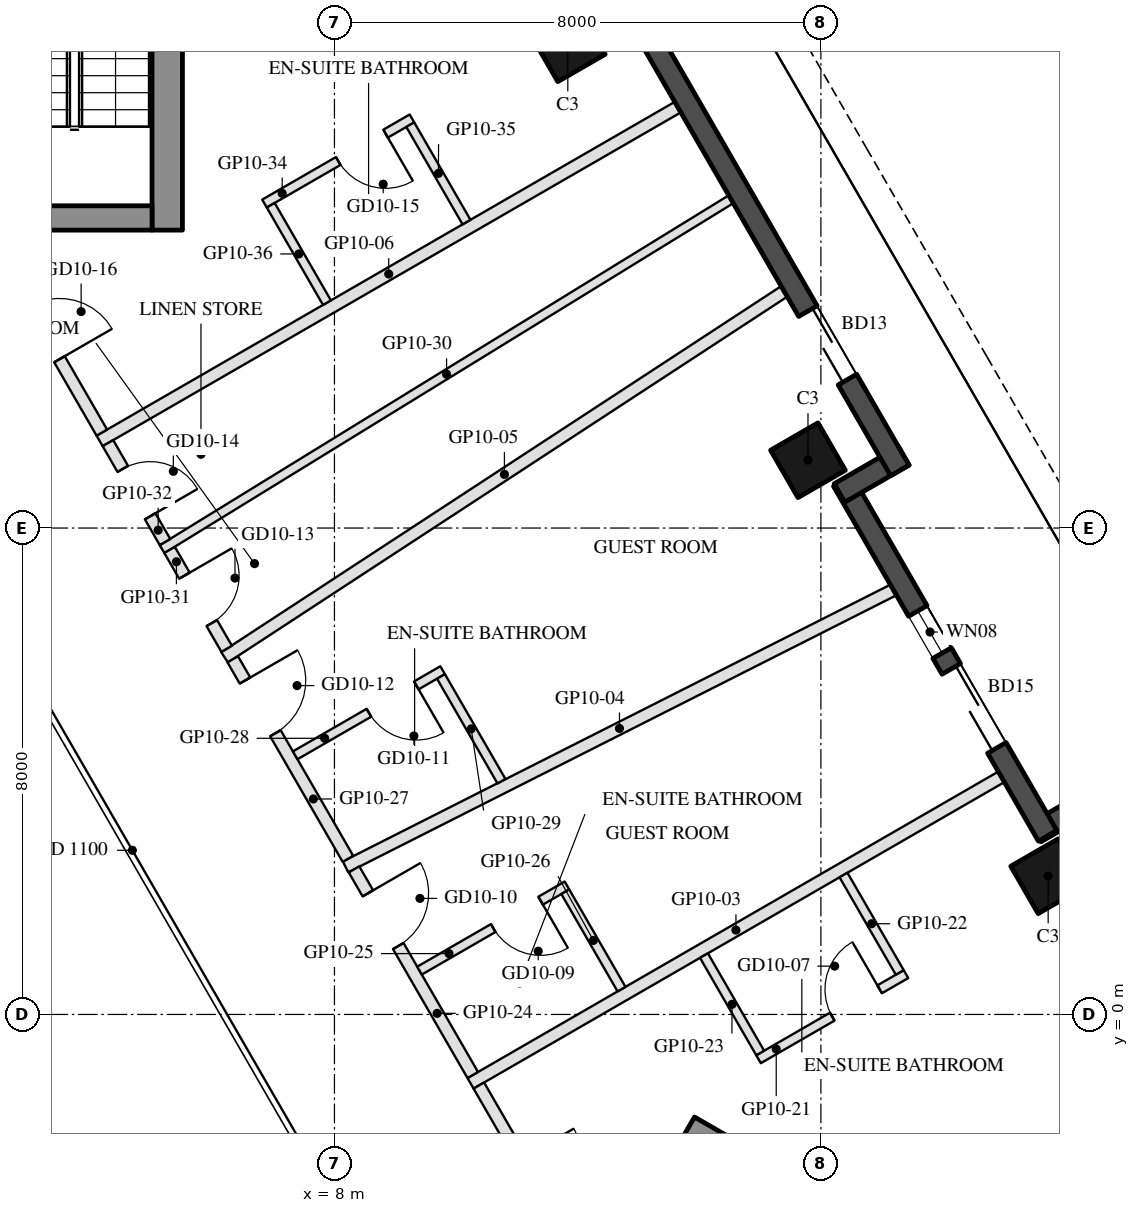
"""IFC4 building model, lengths in metres.
Left out: names, types, materials, properties, quantities, classifications, styles, units other than length and angle.
Written with IfcOpenShell. Run it as: python <this file> out.ifc"""

import sys

from ifc_helpers import new_model, si_unit, direction, frame, frame_2d, origin, origin_2d, place, context, subcontext, project, spatial, rectangle, hollow_rectangle, extrude, element, fill, save


model = new_model("IFC4")
c1 = context("Model", 3, precision=1e-05, world=origin(), true_north=direction((0.0, 1.0)))
c2 = subcontext(c1, "Body", "Model", "MODEL_VIEW")
j1 = project(units=[si_unit("LENGTHUNIT", "METRE"), si_unit("PLANEANGLEUNIT", "RADIAN")], contexts=[c1])
p1 = place(None, origin())
s1 = spatial("IfcSite", under=j1, at=p1, CompositionType="ELEMENT")
p2 = place(p1, origin())
s2 = spatial("IfcBuilding", under=s1, at=p2, CompositionType="ELEMENT")
p3 = place(p2, frame((0.0, 0.0, 120.5)))
s3 = spatial("IfcBuildingStorey", under=s2, at=p3, CompositionType="ELEMENT", Elevation=120.5)
for number, where, z_axis, x_axis in (
    (1, (19.738, 2.273, 0.0), (0.0, 0.0, 1.0), (-0.5, 0.866, 0.0)),
    (2, (15.788, 9.115, 0.0), (0.0, 0.0, 1.0), (-0.5, 0.866, 0.0)),
    (3, (11.838, 15.957, 0.0), (0.0, 0.0, 1.0), (-0.5, 0.866, 0.0)),
):
    element("IfcColumn", number, at=place(p3, frame(where, z_axis=z_axis, x_axis=x_axis)), inside=s3, PredefinedType="COLUMN", context=c2, shape_type="SweptSolid", body=[
        extrude(hollow_rectangle(XDim=0.9, YDim=0.9, WallThickness=0.04, at=origin_2d()), origin(), (0.0, 0.0, 1.0), 3.7),
    ])
p4 = place(p3, frame((20.588, 3.601, 0.0), z_axis=(0.0, 0.0, 1.0), x_axis=(-0.866005645448, -0.500034220881, 0.0)))
e4 = element("IfcWall", 4, at=p4, inside=s3, PredefinedType="SOLIDWALL", context=c2, shape_type="SweptSolid", body=[
    extrude(rectangle(XDim=1.22, YDim=0.35, at=frame_2d((0.61, 0.0))), origin(), (0.0, 0.0, 1.0), 3.55),
])
p5 = place(p3, frame((19.729, 2.938, 0.0), z_axis=(0.0, 0.0, 1.0), x_axis=(-0.499976430342, 0.866039011305, 0.0)))
e5 = element("IfcWall", 5, at=p5, inside=s3, PredefinedType="SOLIDWALL", context=c2, shape_type="SweptSolid", body=[
    extrude(rectangle(XDim=6.74, YDim=0.35, at=frame_2d((3.37, 0.0))), origin(), (0.0, 0.0, 1.0), 3.55),
])
p6 = place(p5, frame((1.67, 0.0, 0.0)))
e6 = element("IfcOpeningElement", 6, at=p6, cuts=e5, PredefinedType="OPENING", context=c2, shape_type="SweptSolid", body=[
    extrude(rectangle(XDim=1.5, YDim=2.4, at=frame_2d((0.75, 1.2))), frame((0.0, 0.185, 0.0), z_axis=(0.0, -1.0, 0.0), x_axis=(1.0, 0.0, 0.0)), (0.0, 0.0, 1.0), 0.37),
])
p7 = place(p5, frame((3.47, 0.0, 0.3)))
e7 = element("IfcOpeningElement", 7, at=p7, cuts=e5, PredefinedType="OPENING", context=c2, shape_type="SweptSolid", body=[
    extrude(rectangle(XDim=0.8, YDim=2.65, at=frame_2d((0.4, 1.325))), frame((0.0, 0.185, 0.0), z_axis=(0.0, -1.0, 0.0), x_axis=(1.0, 0.0, 0.0)), (0.0, 0.0, 1.0), 0.37),
])
p8 = place(p3, frame((16.306, 8.577, 0.0), z_axis=(0.0, 0.0, 1.0), x_axis=(0.866092288191, 0.499884134912, 0.0)))
e8 = element("IfcWall", 8, at=p8, inside=s3, PredefinedType="SOLIDWALL", context=c2, shape_type="SweptSolid", body=[
    extrude(rectangle(XDim=1.22, YDim=0.35, at=frame_2d((0.61, 0.0))), origin(), (0.0, 0.0, 1.0), 3.55),
])
p9 = place(p3, frame((17.299, 8.948, 0.0), z_axis=(0.0, 0.0, 1.0), x_axis=(-0.500010041276, 0.866019606374, 0.0)))
e9 = element("IfcWall", 9, at=p9, inside=s3, PredefinedType="SOLIDWALL", context=c2, shape_type="SweptSolid", body=[
    extrude(rectangle(XDim=9.7, YDim=0.35, at=frame_2d((4.85, 0.0))), origin(), (0.0, 0.0, 1.0), 3.55),
])
p10 = place(p9, frame((1.725, 0.0, 0.0)))
e10 = element("IfcOpeningElement", 10, at=p10, cuts=e9, PredefinedType="OPENING", context=c2, shape_type="SweptSolid", body=[
    extrude(rectangle(XDim=1.3, YDim=2.4, at=frame_2d((0.65, 1.2))), frame((0.0, 0.185, 0.0), z_axis=(0.0, -1.0, 0.0), x_axis=(1.0, 0.0, 0.0)), (0.0, 0.0, 1.0), 0.37),
])
p11 = place(p3, frame((5.25, 12.9, 0.0), z_axis=(0.0, 0.0, 1.0), x_axis=(0.0, 1.0, 0.0)))
e11 = element("IfcWall", 11, at=p11, inside=s3, PredefinedType="SHEAR", context=c2, shape_type="SweptSolid", body=[
    extrude(rectangle(XDim=14.837, YDim=0.5, at=frame_2d((7.418, 0.0))), origin(), (0.0, 0.0, 1.0), 3.5),
])
p12 = place(p3, frame((5.0, 13.1, 0.0), z_axis=(0.0, 0.0, 1.0), x_axis=(-1.0, 0.0, 0.0)))
e12 = element("IfcWall", 12, at=p12, inside=s3, PredefinedType="SHEAR", context=c2, shape_type="SweptSolid", body=[
    extrude(rectangle(XDim=10.0, YDim=0.4, at=frame_2d((5.0, 0.0))), origin(), (0.0, 0.0, 1.0), 3.5),
])
p13 = place(p12, frame((3.55, 0.0, 0.0)))
e13 = element("IfcOpeningElement", 13, at=p13, cuts=e12, PredefinedType="OPENING", context=c2, shape_type="SweptSolid", body=[
    extrude(rectangle(XDim=1.1, YDim=2.1, at=frame_2d((0.55, 1.05))), frame((0.0, 0.21, 0.0), z_axis=(0.0, -1.0, 0.0), x_axis=(1.0, 0.0, 0.0)), (0.0, 0.0, 1.0), 0.42),
])
p14 = place(p12, frame((5.85, 0.0, 0.0)))
e14 = element("IfcOpeningElement", 14, at=p14, cuts=e12, PredefinedType="OPENING", context=c2, shape_type="SweptSolid", body=[
    extrude(rectangle(XDim=1.4, YDim=2.1, at=frame_2d((0.7, 1.05))), frame((0.0, 0.21, 0.0), z_axis=(0.0, -1.0, 0.0), x_axis=(1.0, 0.0, 0.0)), (0.0, 0.0, 1.0), 0.42),
])
p15 = place(p3, frame((13.797, -1.903, 0.0), z_axis=(0.0, 0.0, 1.0), x_axis=(0.866025009528, -0.500000682871, 0.0)))
e15 = element("IfcWall", 15, at=p15, inside=s3, PredefinedType="SHEAR", context=c2, shape_type="SweptSolid", body=[
    extrude(rectangle(XDim=14.837, YDim=0.5, at=frame_2d((7.418, 0.0))), origin(), (0.0, 0.0, 1.0), 3.5),
])
p16 = place(p3, frame((18.968, 3.907, 0.0), z_axis=(0.0, 0.0, 1.0), x_axis=(-0.866022637375, -0.500004791531, 0.0)))
e16 = element("IfcWall", 16, at=p16, inside=s3, PredefinedType="PARTITIONING", context=c2, shape_type="SweptSolid", body=[
    extrude(rectangle(XDim=10.08, YDim=0.2, at=frame_2d((5.04, 0.0))), origin(), (0.0, 0.0, 1.0), 2.96),
])
p17 = place(p3, frame((17.192, 6.982, 0.0), z_axis=(0.0, 0.0, 1.0), x_axis=(-0.892469554868, -0.451107629766, 0.0)))
e17 = element("IfcWall", 17, at=p17, inside=s3, PredefinedType="PARTITIONING", context=c2, shape_type="SweptSolid", body=[
    extrude(rectangle(XDim=10.096, YDim=0.2, at=frame_2d((5.048, 0.0))), origin(), (0.0, 0.0, 1.0), 2.96),
])
p18 = place(p3, frame((15.397, 11.892, 0.0), z_axis=(0.0, 0.0, 1.0), x_axis=(-0.836898817878, -0.547357624076, 0.0)))
e18 = element("IfcWall", 18, at=p18, inside=s3, PredefinedType="PARTITIONING", context=c2, shape_type="SweptSolid", body=[
    extrude(rectangle(XDim=10.997, YDim=0.2, at=frame_2d((5.499, 0.0))), origin(), (0.0, 0.0, 1.0), 2.96),
])
p19 = place(p3, frame((13.647, 14.923, 0.0), z_axis=(0.0, 0.0, 1.0), x_axis=(-0.866027479907, -0.499996404033, 0.0)))
e19 = element("IfcWall", 19, at=p19, inside=s3, PredefinedType="PARTITIONING", context=c2, shape_type="SweptSolid", body=[
    extrude(rectangle(XDim=10.98, YDim=0.2, at=frame_2d((5.49, 0.0))), origin(), (0.0, 0.0, 1.0), 2.96),
])
p20 = place(p3, frame((10.375, -1.169, 0.0), z_axis=(0.0, 0.0, 1.0), x_axis=(0.500055316652, -0.865993464345, 0.0)))
e20 = element("IfcWall", 20, at=p20, inside=s3, PredefinedType="PARTITIONING", context=c2, shape_type="SweptSolid", body=[
    extrude(rectangle(XDim=3.788, YDim=0.2, at=frame_2d((1.894, 0.0))), origin(), (0.0, 0.0, 1.0), 2.95),
])
p21 = place(p20, frame((1.394, 0.0, 0.0)))
e21 = element("IfcOpeningElement", 21, at=p21, cuts=e20, PredefinedType="OPENING", context=c2, shape_type="SweptSolid", body=[
    extrude(rectangle(XDim=1.0, YDim=2.1, at=frame_2d((0.5, 1.05))), frame((0.0, 0.11, 0.0), z_axis=(0.0, -1.0, 0.0), x_axis=(1.0, 0.0, 0.0)), (0.0, 0.0, 1.0), 0.22),
])
p22 = place(p3, frame((14.974, -0.737, 0.0), z_axis=(0.0, 0.0, 1.0), x_axis=(0.866018616679, 0.500011755427, 0.0)))
e22 = element("IfcWall", 22, at=p22, inside=s3, PredefinedType="PARTITIONING", context=c2, shape_type="SweptSolid", body=[
    extrude(rectangle(XDim=2.8, YDim=0.15, at=frame_2d((1.4, 0.0))), origin(), (0.0, 0.0, 1.0), 3.55),
])
p23 = place(p22, frame((1.4, 0.0, 0.0)))
e23 = element("IfcOpeningElement", 23, at=p23, cuts=e22, PredefinedType="OPENING", context=c2, shape_type="SweptSolid", body=[
    extrude(rectangle(XDim=0.9, YDim=2.1, at=frame_2d((0.45, 1.05))), frame((0.0, 0.085, 0.0), z_axis=(0.0, -1.0, 0.0), x_axis=(1.0, 0.0, 0.0)), (0.0, 0.0, 1.0), 0.17),
])
p24 = place(p3, frame((17.297, 0.691, 0.0), z_axis=(0.0, 0.0, 1.0), x_axis=(-0.499985172903, 0.866033964044, 0.0)))
e24 = element("IfcWall", 24, at=p24, inside=s3, PredefinedType="PARTITIONING", context=c2, shape_type="SweptSolid", body=[
    extrude(rectangle(XDim=1.85, YDim=0.15, at=frame_2d((0.925, 0.0))), origin(), (0.0, 0.0, 1.0), 2.95),
])
p25 = place(p3, frame((15.002, -0.634, 0.0), z_axis=(0.0, 0.0, 1.0), x_axis=(-0.500042316284, 0.866000971088, 0.0)))
e25 = element("IfcWall", 25, at=p25, inside=s3, PredefinedType="PARTITIONING", context=c2, shape_type="SweptSolid", body=[
    extrude(rectangle(XDim=1.85, YDim=0.15, at=frame_2d((0.925, 0.0))), origin(), (0.0, 0.0, 1.0), 2.95),
])
p26 = place(p3, frame((8.322, 2.386, 0.0), z_axis=(0.0, 0.0, 1.0), x_axis=(0.499998439657, -0.866026304647, 0.0)))
e26 = element("IfcWall", 26, at=p26, inside=s3, PredefinedType="PARTITIONING", context=c2, shape_type="SweptSolid", body=[
    extrude(rectangle(XDim=3.905, YDim=0.2, at=frame_2d((1.953, 0.0))), origin(), (0.0, 0.0, 1.0), 2.95),
])
p27 = place(p26, frame((0.455, 0.0, 0.0)))
e27 = element("IfcOpeningElement", 27, at=p27, cuts=e26, PredefinedType="OPENING", context=c2, shape_type="SweptSolid", body=[
    extrude(rectangle(XDim=1.0, YDim=2.1, at=frame_2d((0.5, 1.05))), frame((0.0, 0.11, 0.0), z_axis=(0.0, -1.0, 0.0), x_axis=(1.0, 0.0, 0.0)), (0.0, 0.0, 1.0), 0.22),
])
p28 = place(p3, frame((11.823, 2.121, 0.0), z_axis=(0.0, 0.0, 1.0), x_axis=(-0.866034573852, -0.49998411664, 0.0)))
e28 = element("IfcWall", 28, at=p28, inside=s3, PredefinedType="PARTITIONING", context=c2, shape_type="SweptSolid", body=[
    extrude(rectangle(XDim=2.8, YDim=0.15, at=frame_2d((1.4, 0.0))), origin(), (0.0, 0.0, 1.0), 2.95),
])
p29 = place(p28, frame((0.5, 0.0, 0.0)))
e29 = element("IfcOpeningElement", 29, at=p29, cuts=e28, PredefinedType="OPENING", context=c2, shape_type="SweptSolid", body=[
    extrude(rectangle(XDim=0.9, YDim=2.1, at=frame_2d((0.45, 1.05))), frame((0.0, 0.085, 0.0), z_axis=(0.0, -1.0, 0.0), x_axis=(1.0, 0.0, 0.0)), (0.0, 0.0, 1.0), 0.17),
])
p30 = place(p3, frame((12.721, 0.416, 0.0), z_axis=(0.0, 0.0, 1.0), x_axis=(-0.499985172903, 0.866033964044, 0.0)))
e30 = element("IfcWall", 30, at=p30, inside=s3, PredefinedType="PARTITIONING", context=c2, shape_type="SweptSolid", body=[
    extrude(rectangle(XDim=1.85, YDim=0.15, at=frame_2d((0.925, 0.0))), origin(), (0.0, 0.0, 1.0), 3.55),
])
p31 = place(p3, frame((6.327, 5.841, 0.0), z_axis=(0.0, 0.0, 1.0), x_axis=(0.499999503755, -0.866025690291, 0.0)))
e31 = element("IfcWall", 31, at=p31, inside=s3, PredefinedType="PARTITIONING", context=c2, shape_type="SweptSolid", body=[
    extrude(rectangle(XDim=3.789, YDim=0.2, at=frame_2d((1.894, 0.0))), origin(), (0.0, 0.0, 1.0), 2.95),
])
p32 = place(p31, frame((0.403, 0.0, 0.0)))
e32 = element("IfcOpeningElement", 32, at=p32, cuts=e31, PredefinedType="OPENING", context=c2, shape_type="SweptSolid", body=[
    extrude(rectangle(XDim=1.0, YDim=2.1, at=frame_2d((0.5, 1.05))), frame((0.0, 0.11, 0.0), z_axis=(0.0, -1.0, 0.0), x_axis=(1.0, 0.0, 0.0)), (0.0, 0.0, 1.0), 0.22),
])
p33 = place(p3, frame((9.779, 5.662, 0.0), z_axis=(0.0, 0.0, 1.0), x_axis=(-0.866034573852, -0.49998411664, 0.0)))
e33 = element("IfcWall", 33, at=p33, inside=s3, PredefinedType="PARTITIONING", context=c2, shape_type="SweptSolid", body=[
    extrude(rectangle(XDim=2.8, YDim=0.15, at=frame_2d((1.4, 0.0))), origin(), (0.0, 0.0, 1.0), 2.95),
])
p34 = place(p33, frame((0.5, 0.0, 0.0)))
e34 = element("IfcOpeningElement", 34, at=p34, cuts=e33, PredefinedType="OPENING", context=c2, shape_type="SweptSolid", body=[
    extrude(rectangle(XDim=0.9, YDim=2.1, at=frame_2d((0.45, 1.05))), frame((0.0, 0.085, 0.0), z_axis=(0.0, -1.0, 0.0), x_axis=(1.0, 0.0, 0.0)), (0.0, 0.0, 1.0), 0.17),
])
p35 = place(p3, frame((10.747, 3.836, 0.0), z_axis=(0.0, 0.0, 1.0), x_axis=(-0.499991453095, 0.866030338286, 0.0)))
e35 = element("IfcWall", 35, at=p35, inside=s3, PredefinedType="PARTITIONING", context=c2, shape_type="SweptSolid", body=[
    extrude(rectangle(XDim=1.99, YDim=0.15, at=frame_2d((0.995, 0.0))), origin(), (0.0, 0.0, 1.0), 2.95),
])
p36 = place(p3, frame((14.522, 13.407, 0.0), z_axis=(0.0, 0.0, 1.0), x_axis=(-0.851781158383, -0.523897755506, 0.0)))
e36 = element("IfcWall", 36, at=p36, inside=s3, PredefinedType="PARTITIONING", context=c2, shape_type="SweptSolid", body=[
    extrude(rectangle(XDim=10.984, YDim=0.15, at=frame_2d((5.492, 0.0))), origin(), (0.0, 0.0, 1.0), 2.95),
])
p37 = place(p3, frame((5.289, 7.64, 0.0), z_axis=(0.0, 0.0, 1.0), x_axis=(0.499985098601, -0.86603400694, 0.0)))
e37 = element("IfcWall", 37, at=p37, inside=s3, PredefinedType="PARTITIONING", context=c2, shape_type="SweptSolid", body=[
    extrude(rectangle(XDim=1.877, YDim=0.2, at=frame_2d((0.939, 0.0))), origin(), (0.0, 0.0, 1.0), 2.95),
])
p38 = place(p37, frame((0.489, 0.0, 0.0)))
e38 = element("IfcOpeningElement", 38, at=p38, cuts=e37, PredefinedType="OPENING", context=c2, shape_type="SweptSolid", body=[
    extrude(rectangle(XDim=0.9, YDim=2.1, at=frame_2d((0.45, 1.05))), frame((0.0, 0.11, 0.0), z_axis=(0.0, -1.0, 0.0), x_axis=(1.0, 0.0, 0.0)), (0.0, 0.0, 1.0), 0.22),
])
p39 = place(p3, frame((4.275, 9.396, 0.0), z_axis=(0.0, 0.0, 1.0), x_axis=(0.499928798138, -0.866066508296, 0.0)))
e39 = element("IfcWall", 39, at=p39, inside=s3, PredefinedType="PARTITIONING", context=c2, shape_type="SweptSolid", body=[
    extrude(rectangle(XDim=1.878, YDim=0.2, at=frame_2d((0.939, 0.0))), origin(), (0.0, 0.0, 1.0), 3.55),
])
p40 = place(p39, frame((0.489, 0.0, 0.0)))
e40 = element("IfcOpeningElement", 40, at=p40, cuts=e39, PredefinedType="OPENING", context=c2, shape_type="SweptSolid", body=[
    extrude(rectangle(XDim=0.9, YDim=2.1, at=frame_2d((0.45, 1.05))), frame((0.0, 0.11, 0.0), z_axis=(0.0, -1.0, 0.0), x_axis=(1.0, 0.0, 0.0)), (0.0, 0.0, 1.0), 0.22),
])
p41 = place(p3, frame((2.281, 12.85, 0.0), z_axis=(0.0, 0.0, 1.0), x_axis=(0.499979074716, -0.866037484666, 0.0)))
e41 = element("IfcWall", 41, at=p41, inside=s3, PredefinedType="PARTITIONING", context=c2, shape_type="SweptSolid", body=[
    extrude(rectangle(XDim=3.788, YDim=0.2, at=frame_2d((1.894, 0.0))), origin(), (0.0, 0.0, 1.0), 2.95),
])
p42 = place(p41, frame((1.394, 0.0, 0.0)))
e42 = element("IfcOpeningElement", 42, at=p42, cuts=e41, PredefinedType="OPENING", context=c2, shape_type="SweptSolid", body=[
    extrude(rectangle(XDim=1.0, YDim=2.1, at=frame_2d((0.5, 1.05))), frame((0.0, 0.11, 0.0), z_axis=(0.0, -1.0, 0.0), x_axis=(1.0, 0.0, 0.0)), (0.0, 0.0, 1.0), 0.22),
])
p43 = place(p3, frame((9.274, 14.737, 0.0), z_axis=(0.0, 0.0, 1.0), x_axis=(-0.866018616679, -0.500011755427, 0.0)))
e43 = element("IfcWall", 43, at=p43, inside=s3, PredefinedType="PARTITIONING", context=c2, shape_type="SweptSolid", body=[
    extrude(rectangle(XDim=2.8, YDim=0.15, at=frame_2d((1.4, 0.0))), origin(), (0.0, 0.0, 1.0), 3.55),
])
p44 = place(p43, frame((0.5, 0.0, 0.0)))
e44 = element("IfcOpeningElement", 44, at=p44, cuts=e43, PredefinedType="OPENING", context=c2, shape_type="SweptSolid", body=[
    extrude(rectangle(XDim=0.9, YDim=2.1, at=frame_2d((0.45, 1.05))), frame((0.0, 0.085, 0.0), z_axis=(0.0, -1.0, 0.0), x_axis=(1.0, 0.0, 0.0)), (0.0, 0.0, 1.0), 0.17),
])
p45 = place(p3, frame((10.172, 13.032, 0.0), z_axis=(0.0, 0.0, 1.0), x_axis=(-0.500042316284, 0.866000971088, 0.0)))
e45 = element("IfcWall", 45, at=p45, inside=s3, PredefinedType="PARTITIONING", context=c2, shape_type="SweptSolid", body=[
    extrude(rectangle(XDim=1.85, YDim=0.15, at=frame_2d((0.925, 0.0))), origin(), (0.0, 0.0, 1.0), 2.95),
])
p46 = place(p3, frame((7.877, 11.707, 0.0), z_axis=(0.0, 0.0, 1.0), x_axis=(-0.499985172903, 0.866033964044, 0.0)))
e46 = element("IfcWall", 46, at=p46, inside=s3, PredefinedType="PARTITIONING", context=c2, shape_type="SweptSolid", body=[
    extrude(rectangle(XDim=1.85, YDim=0.15, at=frame_2d((0.925, 0.0))), origin(), (0.0, 0.0, 1.0), 2.95),
])
p47 = place(p6, frame((1.5, 0.0, 0.0), z_axis=(0.0, 0.0, 1.0), x_axis=(-1.0, 0.0, 0.0)))
e47 = element("IfcDoor", 47, at=p47, inside=s3, OperationType="SLIDING_TO_LEFT", PredefinedType="DOOR", context=c2, shape_type="SweptSolid", body=[
    extrude(rectangle(XDim=1.5, YDim=2.4, at=frame_2d((0.75, 1.2))), frame((0.0, 0.025, 0.0), z_axis=(0.0, -1.0, 0.0), x_axis=(1.0, 0.0, 0.0)), (0.0, 0.0, 1.0), 0.05),
])
fill(e6, e47)
p48 = place(p7, origin())
e48 = element("IfcWindow", 48, at=p48, inside=s3, PartitioningType="SINGLE_PANEL", PredefinedType="WINDOW", context=c2, shape_type="SweptSolid", body=[
    extrude(rectangle(XDim=0.8, YDim=2.65, at=frame_2d((0.4, 1.325))), frame((0.0, 0.03, 0.0), z_axis=(0.0, -1.0, 0.0), x_axis=(1.0, 0.0, 0.0)), (0.0, 0.0, 1.0), 0.06),
])
fill(e7, e48)
p49 = place(p10, frame((1.3, 0.0, 0.0), z_axis=(0.0, 0.0, 1.0), x_axis=(-1.0, 0.0, 0.0)))
e49 = element("IfcDoor", 49, at=p49, inside=s3, OperationType="SLIDING_TO_LEFT", PredefinedType="DOOR", context=c2, shape_type="SweptSolid", body=[
    extrude(rectangle(XDim=1.3, YDim=2.4, at=frame_2d((0.65, 1.2))), frame((0.0, 0.025, 0.0), z_axis=(0.0, -1.0, 0.0), x_axis=(1.0, 0.0, 0.0)), (0.0, 0.0, 1.0), 0.05),
])
fill(e10, e49)
p50 = place(p23, origin())
e50 = element("IfcDoor", 50, at=p50, inside=s3, OperationType="SINGLE_SWING_RIGHT", PredefinedType="DOOR", context=c2, shape_type="SweptSolid", body=[
    extrude(rectangle(XDim=0.9, YDim=2.1, at=frame_2d((0.45, 1.05))), frame((0.0, 0.025, 0.0), z_axis=(0.0, -1.0, 0.0), x_axis=(1.0, 0.0, 0.0)), (0.0, 0.0, 1.0), 0.05),
])
fill(e23, e50)
p51 = place(p29, origin())
e51 = element("IfcDoor", 51, at=p51, inside=s3, OperationType="SINGLE_SWING_LEFT", PredefinedType="DOOR", context=c2, shape_type="SweptSolid", body=[
    extrude(rectangle(XDim=0.9, YDim=2.1, at=frame_2d((0.45, 1.05))), frame((0.0, 0.025, 0.0), z_axis=(0.0, -1.0, 0.0), x_axis=(1.0, 0.0, 0.0)), (0.0, 0.0, 1.0), 0.05),
])
fill(e29, e51)
p52 = place(p27, origin())
e52 = element("IfcDoor", 52, at=p52, inside=s3, OperationType="SINGLE_SWING_LEFT", PredefinedType="DOOR", context=c2, shape_type="SweptSolid", body=[
    extrude(rectangle(XDim=1.0, YDim=2.1, at=frame_2d((0.5, 1.05))), frame((0.0, 0.025, 0.0), z_axis=(0.0, -1.0, 0.0), x_axis=(1.0, 0.0, 0.0)), (0.0, 0.0, 1.0), 0.05),
])
fill(e27, e52)
p53 = place(p34, origin())
e53 = element("IfcDoor", 53, at=p53, inside=s3, OperationType="SINGLE_SWING_LEFT", PredefinedType="DOOR", context=c2, shape_type="SweptSolid", body=[
    extrude(rectangle(XDim=0.9, YDim=2.1, at=frame_2d((0.45, 1.05))), frame((0.0, 0.025, 0.0), z_axis=(0.0, -1.0, 0.0), x_axis=(1.0, 0.0, 0.0)), (0.0, 0.0, 1.0), 0.05),
])
fill(e34, e53)
p54 = place(p32, origin())
e54 = element("IfcDoor", 54, at=p54, inside=s3, OperationType="SINGLE_SWING_LEFT", PredefinedType="DOOR", context=c2, shape_type="SweptSolid", body=[
    extrude(rectangle(XDim=1.0, YDim=2.1, at=frame_2d((0.5, 1.05))), frame((0.0, 0.025, 0.0), z_axis=(0.0, -1.0, 0.0), x_axis=(1.0, 0.0, 0.0)), (0.0, 0.0, 1.0), 0.05),
])
fill(e32, e54)
p55 = place(p38, origin())
e55 = element("IfcDoor", 55, at=p55, inside=s3, OperationType="SINGLE_SWING_LEFT", PredefinedType="DOOR", context=c2, shape_type="SweptSolid", body=[
    extrude(rectangle(XDim=0.9, YDim=2.1, at=frame_2d((0.45, 1.05))), frame((0.0, 0.025, 0.0), z_axis=(0.0, -1.0, 0.0), x_axis=(1.0, 0.0, 0.0)), (0.0, 0.0, 1.0), 0.05),
])
fill(e38, e55)
p56 = place(p40, origin())
e56 = element("IfcDoor", 56, at=p56, inside=s3, OperationType="SINGLE_SWING_RIGHT", PredefinedType="DOOR", context=c2, shape_type="SweptSolid", body=[
    extrude(rectangle(XDim=0.9, YDim=2.1, at=frame_2d((0.45, 1.05))), frame((0.0, 0.025, 0.0), z_axis=(0.0, -1.0, 0.0), x_axis=(1.0, 0.0, 0.0)), (0.0, 0.0, 1.0), 0.05),
])
fill(e40, e56)
p57 = place(p44, origin())
e57 = element("IfcDoor", 57, at=p57, inside=s3, OperationType="SINGLE_SWING_LEFT", PredefinedType="DOOR", context=c2, shape_type="SweptSolid", body=[
    extrude(rectangle(XDim=0.9, YDim=2.1, at=frame_2d((0.45, 1.05))), frame((0.0, 0.025, 0.0), z_axis=(0.0, -1.0, 0.0), x_axis=(1.0, 0.0, 0.0)), (0.0, 0.0, 1.0), 0.05),
])
fill(e44, e57)
p58 = place(p42, origin())
e58 = element("IfcDoor", 58, at=p58, inside=s3, OperationType="SINGLE_SWING_RIGHT", PredefinedType="DOOR", context=c2, shape_type="SweptSolid", body=[
    extrude(rectangle(XDim=1.0, YDim=2.1, at=frame_2d((0.5, 1.05))), frame((0.0, 0.025, 0.0), z_axis=(0.0, -1.0, 0.0), x_axis=(1.0, 0.0, 0.0)), (0.0, 0.0, 1.0), 0.05),
])
fill(e42, e58)
save(model, sys.argv[1])
